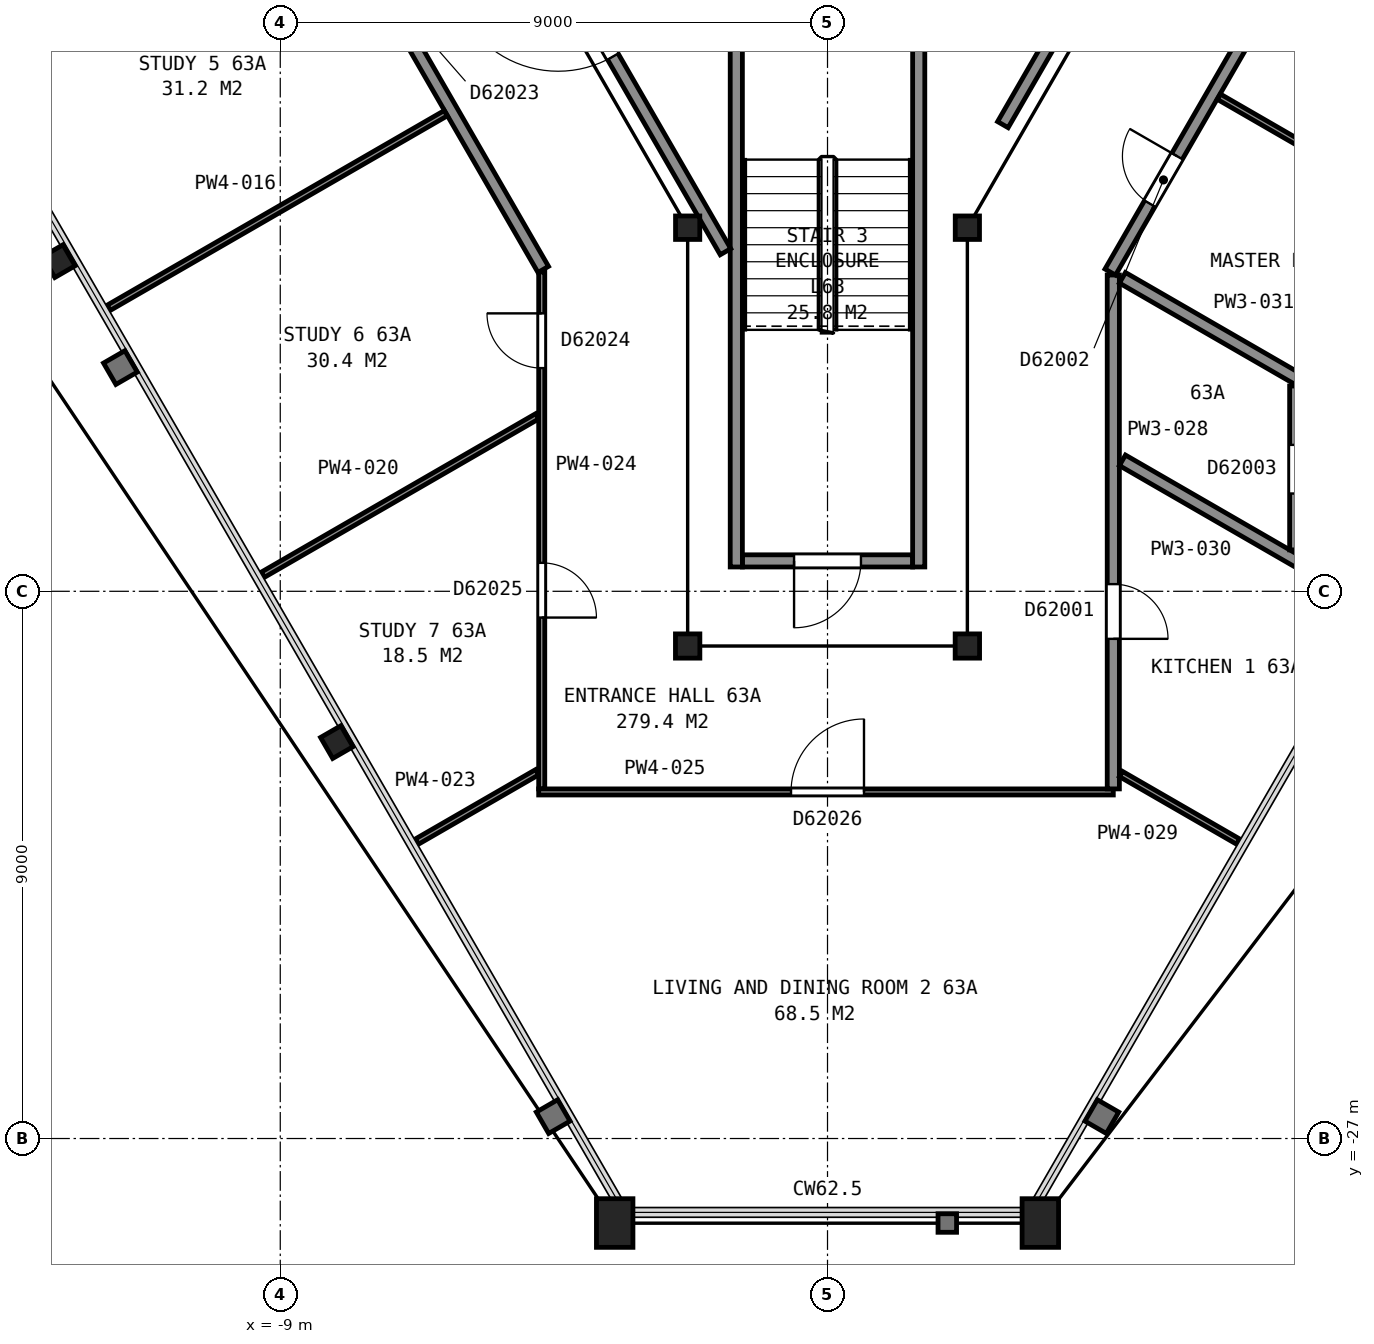
"""IFC4 building model, lengths in metres.
Left out: names, types, materials, properties, quantities, classifications, styles, units other than length and angle.
Written with IfcOpenShell. Run it as: python <this file> out.ifc"""

import sys

from ifc_helpers import new_model, si_unit, direction, frame, frame_2d, origin, origin_2d, place, context, subcontext, project, spatial, rectangle, hollow_rectangle, i_section, extrude, element, fill, save


model = new_model("IFC4")
c1 = context("Model", 3, precision=1e-05, world=origin(), true_north=direction((0.0, 1.0)))
c2 = subcontext(c1, "Body", "Model", "MODEL_VIEW")
j1 = project(units=[si_unit("LENGTHUNIT", "METRE"), si_unit("PLANEANGLEUNIT", "RADIAN")], contexts=[c1])
p1 = place(None, origin())
s1 = spatial("IfcSite", under=j1, at=p1, CompositionType="ELEMENT")
p2 = place(p1, origin())
s2 = spatial("IfcBuilding", under=s1, at=p2, CompositionType="ELEMENT")
p3 = place(p2, frame((0.0, 0.0, 250.8)))
s3 = spatial("IfcBuildingStorey", under=s2, at=p3, CompositionType="ELEMENT", Elevation=250.8)
for number, where, z_axis, x_axis in (
    (1, (-12.64, -12.57, 0.0), (0.0, 0.0, 1.0), (-0.5, 0.866, 0.0)),
    (2, (-8.07, -20.48, 0.0), (0.0, 0.0, 1.0), (-0.5, 0.866, 0.0)),
):
    element("IfcColumn", number, at=place(p3, frame(where, z_axis=z_axis, x_axis=x_axis)), inside=s3, PredefinedType="COLUMN", context=c2, shape_type="SweptSolid", body=[
        extrude(i_section(OverallWidth=0.399, OverallDepth=0.386, WebThickness=0.021, FlangeThickness=0.033, FilletRadius=0.015, at=origin_2d()), origin(), (0.0, 0.0, 1.0), 3.7),
    ])
for number, where, z_axis, x_axis in (
    (3, (-3.5, -28.39, 0.0), (0.0, 0.0, 1.0), (-1.0, 0.0, 0.0)),
    (4, (3.5, -28.39, 0.0), (0.0, 0.0, 1.0), (-1.0, 0.0, 0.0)),
):
    element("IfcColumn", number, at=place(p3, frame(where, z_axis=z_axis, x_axis=x_axis)), inside=s3, PredefinedType="COLUMN", context=c2, shape_type="SweptSolid", body=[
        extrude(hollow_rectangle(XDim=0.6, YDim=0.8, WallThickness=0.05, at=origin_2d()), origin(), (0.0, 0.0, 1.0), 3.7),
    ])
p4 = place(p3, frame((-2.3, -12.02, 0.0), z_axis=(0.0, 0.0, 1.0), x_axis=(1.0, 0.0, 0.0)))
e5 = element("IfcColumn", 5, at=p4, inside=s3, PredefinedType="COLUMN", context=c2, shape_type="SweptSolid", body=[
    extrude(i_section(OverallWidth=0.399, OverallDepth=0.386, WebThickness=0.021, FlangeThickness=0.033, FilletRadius=0.015, at=origin_2d()), origin(), (0.0, 0.0, 1.0), 3.7),
])
for number, where, z_axis, x_axis in (
    (6, (-2.3, -18.9, 0.0), (0.0, 0.0, 1.0), (-1.0, 0.0, 0.0)),
    (7, (2.3, -18.9, 0.0), (0.0, 0.0, 1.0), (-1.0, 0.0, 0.0)),
):
    element("IfcColumn", number, at=place(p3, frame(where, z_axis=z_axis, x_axis=x_axis)), inside=s3, PredefinedType="COLUMN", context=c2, shape_type="SweptSolid", body=[
        extrude(i_section(OverallWidth=0.401, OverallDepth=0.399, WebThickness=0.025, FlangeThickness=0.04, FilletRadius=0.015, at=origin_2d()), origin(), (0.0, 0.0, 1.0), 3.7),
    ])
p5 = place(p3, frame((2.3, -12.02, 0.0), z_axis=(0.0, 0.0, 1.0), x_axis=(1.0, 0.0, 0.0)))
e8 = element("IfcColumn", 8, at=p5, inside=s3, PredefinedType="COLUMN", context=c2, shape_type="SweptSolid", body=[
    extrude(i_section(OverallWidth=0.399, OverallDepth=0.386, WebThickness=0.021, FlangeThickness=0.033, FilletRadius=0.015, at=origin_2d()), origin(), (0.0, 0.0, 1.0), 3.7),
])
p6 = place(p3, frame((-1.4, -17.5, 0.0), z_axis=(0.0, 0.0, 1.0), x_axis=(1.0, 0.0, 0.0)))
e9 = element("IfcWall", 9, at=p6, inside=s3, PredefinedType="PARTITIONING", context=c2, shape_type="SweptSolid", body=[
    extrude(rectangle(XDim=2.8, YDim=0.2, at=frame_2d((1.4, 0.0))), origin(), (0.0, 0.0, 1.0), 3.45),
])
p7 = place(p6, frame((0.85, 0.0, 0.0)))
e10 = element("IfcOpeningElement", 10, at=p7, cuts=e9, PredefinedType="OPENING", context=c2, shape_type="SweptSolid", body=[
    extrude(rectangle(XDim=1.1, YDim=2.1, at=frame_2d((0.55, 1.05))), frame((0.0, 0.11, 0.0), z_axis=(0.0, -1.0, 0.0), x_axis=(1.0, 0.0, 0.0)), (0.0, 0.0, 1.0), 0.22),
])
for number, where, z_axis, x_axis in (
    (11, (1.5, -8.0, 0.0), (0.0, 0.0, 1.0), (0.0, -1.0, 0.0)),
    (12, (-1.5, -8.0, 0.0), (0.0, 0.0, 1.0), (0.0, -1.0, 0.0)),
):
    element("IfcWall", number, at=place(p3, frame(where, z_axis=z_axis, x_axis=x_axis)), inside=s3, PredefinedType="PARTITIONING", context=c2, shape_type="SweptSolid", body=[
        extrude(rectangle(XDim=9.6, YDim=0.2, at=frame_2d((4.8, 0.0))), origin(), (0.0, 0.0, 1.0), 3.45),
    ])
p8 = place(p3, frame((-4.655, -7.257, 0.0), z_axis=(0.0, 0.0, 1.0), x_axis=(0.499966124405, -0.866044960985, 0.0)))
e13 = element("IfcWall", 13, at=p8, inside=s3, PredefinedType="PARTITIONING", context=c2, shape_type="SweptSolid", body=[
    extrude(rectangle(XDim=5.956, YDim=0.2, at=frame_2d((2.978, 0.0))), origin(), (0.0, 0.0, 1.0), 3.45),
])
p9 = place(p8, frame((0.45, 0.0, 0.0)))
e14 = element("IfcOpeningElement", 14, at=p9, cuts=e13, PredefinedType="OPENING", context=c2, shape_type="SweptSolid", body=[
    extrude(rectangle(XDim=1.8, YDim=2.1, at=frame_2d((0.9, 1.05))), frame((0.0, 0.11, 0.0), z_axis=(0.0, -1.0, 0.0), x_axis=(1.0, 0.0, 0.0)), (0.0, 0.0, 1.0), 0.22),
])
p10 = place(p3, frame((2.884, -10.325, 0.0), z_axis=(0.0, 0.0, 1.0), x_axis=(0.500094932804, 0.865970587366, 0.0)))
e15 = element("IfcWall", 15, at=p10, inside=s3, PredefinedType="PARTITIONING", context=c2, shape_type="SweptSolid", body=[
    extrude(rectangle(XDim=3.763, YDim=0.2, at=frame_2d((1.882, 0.0))), origin(), (0.0, 0.0, 1.0), 3.45),
])
p11 = place(p3, frame((-4.675, -12.706, 0.0), z_axis=(0.0, 0.0, 1.0), x_axis=(-0.499972470324, 0.866041297467, 0.0)))
e16 = element("IfcWall", 16, at=p11, inside=s3, PredefinedType="PARTITIONING", context=c2, shape_type="SweptSolid", body=[
    extrude(rectangle(XDim=17.385, YDim=0.2, at=frame_2d((8.692, 0.0))), origin(), (0.0, 0.0, 1.0), 2.713),
])
p12 = place(p11, frame((14.57, 0.0, 0.0)))
e17 = element("IfcOpeningElement", 17, at=p12, cuts=e16, PredefinedType="OPENING", context=c2, shape_type="SweptSolid", body=[
    extrude(rectangle(XDim=0.9, YDim=2.1, at=frame_2d((0.45, 1.05))), frame((0.0, 0.11, 0.0), z_axis=(0.0, -1.0, 0.0), x_axis=(1.0, 0.0, 0.0)), (0.0, 0.0, 1.0), 0.22),
])
p13 = place(p11, frame((11.777, 0.0, 0.0)))
e18 = element("IfcOpeningElement", 18, at=p13, cuts=e16, PredefinedType="OPENING", context=c2, shape_type="SweptSolid", body=[
    extrude(rectangle(XDim=0.9, YDim=2.1, at=frame_2d((0.45, 1.05))), frame((0.0, 0.11, 0.0), z_axis=(0.0, -1.0, 0.0), x_axis=(1.0, 0.0, 0.0)), (0.0, 0.0, 1.0), 0.22),
])
p14 = place(p11, frame((5.095, 0.0, 0.0)))
e19 = element("IfcOpeningElement", 19, at=p14, cuts=e16, PredefinedType="OPENING", context=c2, shape_type="SweptSolid", body=[
    extrude(rectangle(XDim=0.9, YDim=2.1, at=frame_2d((0.45, 1.05))), frame((0.0, 0.11, 0.0), z_axis=(0.0, -1.0, 0.0), x_axis=(1.0, 0.0, 0.0)), (0.0, 0.0, 1.0), 0.22),
])
p15 = place(p3, frame((-11.821, -13.337, 0.0), z_axis=(0.0, 0.0, 1.0), x_axis=(0.866013405822, 0.500020780506, 0.0)))
e20 = element("IfcWall", 20, at=p15, inside=s3, PredefinedType="PARTITIONING", context=c2, shape_type="SweptSolid", body=[
    extrude(rectangle(XDim=6.399, YDim=0.1, at=frame_2d((3.2, 0.0))), origin(), (0.0, 0.0, 1.0), 2.713),
])
p16 = place(p3, frame((-9.286, -17.727, 0.0), z_axis=(0.0, 0.0, 1.0), x_axis=(0.865990461678, 0.50006051662, 0.0)))
e21 = element("IfcWall", 21, at=p16, inside=s3, PredefinedType="PARTITIONING", context=c2, shape_type="SweptSolid", body=[
    extrude(rectangle(XDim=5.209, YDim=0.1, at=frame_2d((2.604, 0.0))), origin(), (0.0, 0.0, 1.0), 2.713),
])
p17 = place(p3, frame((-6.752, -22.116, 0.0), z_axis=(0.0, 0.0, 1.0), x_axis=(0.866135723987, 0.499808871103, 0.0)))
e22 = element("IfcWall", 22, at=p17, inside=s3, PredefinedType="PARTITIONING", context=c2, shape_type="SweptSolid", body=[
    extrude(rectangle(XDim=2.283, YDim=0.1, at=frame_2d((1.141, 0.0))), origin(), (0.0, 0.0, 1.0), 2.713),
])
p18 = place(p3, frame((-4.7, -21.25, 0.0), z_axis=(0.0, 0.0, 1.0), x_axis=(0.0, 1.0, 0.0)))
e23 = element("IfcWall", 23, at=p18, inside=s3, PredefinedType="PARTITIONING", context=c2, shape_type="SweptSolid", body=[
    extrude(rectangle(XDim=8.502, YDim=0.1, at=frame_2d((4.251, 0.0))), origin(), (0.0, 0.0, 1.0), 2.713),
])
p19 = place(p18, frame((6.921, 0.0, 0.0)))
e24 = element("IfcOpeningElement", 24, at=p19, cuts=e23, PredefinedType="OPENING", context=c2, shape_type="SweptSolid", body=[
    extrude(rectangle(XDim=0.9, YDim=2.1, at=frame_2d((0.45, 1.05))), frame((0.0, 0.06, 0.0), z_axis=(0.0, -1.0, 0.0), x_axis=(1.0, 0.0, 0.0)), (0.0, 0.0, 1.0), 0.12),
])
p20 = place(p18, frame((2.818, 0.0, 0.0)))
e25 = element("IfcOpeningElement", 25, at=p20, cuts=e23, PredefinedType="OPENING", context=c2, shape_type="SweptSolid", body=[
    extrude(rectangle(XDim=0.9, YDim=2.1, at=frame_2d((0.45, 1.05))), frame((0.0, 0.06, 0.0), z_axis=(0.0, -1.0, 0.0), x_axis=(1.0, 0.0, 0.0)), (0.0, 0.0, 1.0), 0.12),
])
p21 = place(p3, frame((4.7, -21.3, 0.0), z_axis=(0.0, 0.0, 1.0), x_axis=(-1.0, 0.0, 0.0)))
e26 = element("IfcWall", 26, at=p21, inside=s3, PredefinedType="PARTITIONING", context=c2, shape_type="SweptSolid", body=[
    extrude(rectangle(XDim=9.45, YDim=0.1, at=frame_2d((4.725, 0.0))), origin(), (0.0, 0.0, 1.0), 2.713),
])
p22 = place(p21, frame((4.1, 0.0, 0.0)))
e27 = element("IfcOpeningElement", 27, at=p22, cuts=e26, PredefinedType="OPENING", context=c2, shape_type="SweptSolid", body=[
    extrude(rectangle(XDim=1.2, YDim=2.1, at=frame_2d((0.6, 1.05))), frame((0.0, 0.06, 0.0), z_axis=(0.0, -1.0, 0.0), x_axis=(1.0, 0.0, 0.0)), (0.0, 0.0, 1.0), 0.12),
])
p23 = place(p3, frame((4.7, -12.798, 0.0), z_axis=(0.0, 0.0, 1.0), x_axis=(0.0, -1.0, 0.0)))
e28 = element("IfcWall", 28, at=p23, inside=s3, PredefinedType="PARTITIONING", context=c2, shape_type="SweptSolid", body=[
    extrude(rectangle(XDim=8.452, YDim=0.2, at=frame_2d((4.226, 0.0))), origin(), (0.0, 0.0, 1.0), 2.713),
])
p24 = place(p23, frame((5.084, 0.0, 0.0)))
e29 = element("IfcOpeningElement", 29, at=p24, cuts=e28, PredefinedType="OPENING", context=c2, shape_type="SweptSolid", body=[
    extrude(rectangle(XDim=0.9, YDim=2.1, at=frame_2d((0.45, 1.05))), frame((0.0, 0.11, 0.0), z_axis=(0.0, -1.0, 0.0), x_axis=(1.0, 0.0, 0.0)), (0.0, 0.0, 1.0), 0.22),
])
p25 = place(p3, frame((4.825, -21.004, 0.0), z_axis=(0.0, 0.0, 1.0), x_axis=(0.866121639155, -0.499833278392, 0.0)))
e30 = element("IfcWall", 30, at=p25, inside=s3, PredefinedType="PARTITIONING", context=c2, shape_type="SweptSolid", body=[
    extrude(rectangle(XDim=2.225, YDim=0.1, at=frame_2d((1.112, 0.0))), origin(), (0.0, 0.0, 1.0), 2.713),
])
p26 = place(p3, frame((4.85, -15.846, 0.0), z_axis=(0.0, 0.0, 1.0), x_axis=(0.866007055173, -0.500031779381, 0.0)))
e31 = element("IfcWall", 31, at=p26, inside=s3, PredefinedType="PARTITIONING", context=c2, shape_type="SweptSolid", body=[
    extrude(rectangle(XDim=4.782, YDim=0.2, at=frame_2d((2.391, 0.0))), origin(), (0.0, 0.0, 1.0), 2.713),
])
p27 = place(p3, frame((4.85, -12.844, 0.0), z_axis=(0.0, 0.0, 1.0), x_axis=(0.866005731893, -0.500034071167, 0.0)))
e32 = element("IfcWall", 32, at=p27, inside=s3, PredefinedType="PARTITIONING", context=c2, shape_type="SweptSolid", body=[
    extrude(rectangle(XDim=3.391, YDim=0.2, at=frame_2d((1.695, 0.0))), origin(), (0.0, 0.0, 1.0), 2.713),
])
p28 = place(p3, frame((13.342, 2.306, 0.0), z_axis=(0.0, 0.0, 1.0), x_axis=(-0.499983003136, -0.866035216706, 0.0)))
e33 = element("IfcWall", 33, at=p28, inside=s3, PredefinedType="PARTITIONING", context=c2, shape_type="SweptSolid", body=[
    extrude(rectangle(XDim=17.385, YDim=0.2, at=frame_2d((8.692, 0.0))), origin(), (0.0, 0.0, 1.0), 2.713),
])
p29 = place(p28, frame((15.185, 0.0, 0.0)))
e34 = element("IfcOpeningElement", 34, at=p29, cuts=e33, PredefinedType="OPENING", context=c2, shape_type="SweptSolid", body=[
    extrude(rectangle(XDim=0.9, YDim=2.1, at=frame_2d((0.45, 1.05))), frame((0.0, 0.11, 0.0), z_axis=(0.0, -1.0, 0.0), x_axis=(1.0, 0.0, 0.0)), (0.0, 0.0, 1.0), 0.22),
])
p30 = place(p28, frame((12.094, 0.0, 0.0)))
e35 = element("IfcOpeningElement", 35, at=p30, cuts=e33, PredefinedType="OPENING", context=c2, shape_type="SweptSolid", body=[
    extrude(rectangle(XDim=0.9, YDim=2.1, at=frame_2d((0.45, 1.05))), frame((0.0, 0.11, 0.0), z_axis=(0.0, -1.0, 0.0), x_axis=(1.0, 0.0, 0.0)), (0.0, 0.0, 1.0), 0.22),
])
p31 = place(p28, frame((5.867, 0.0, 0.0)))
e36 = element("IfcOpeningElement", 36, at=p31, cuts=e33, PredefinedType="OPENING", context=c2, shape_type="SweptSolid", body=[
    extrude(rectangle(XDim=0.9, YDim=2.1, at=frame_2d((0.45, 1.05))), frame((0.0, 0.11, 0.0), z_axis=(0.0, -1.0, 0.0), x_axis=(1.0, 0.0, 0.0)), (0.0, 0.0, 1.0), 0.22),
])
p32 = place(p28, frame((1.392, 0.0, 0.0)))
e37 = element("IfcOpeningElement", 37, at=p32, cuts=e33, PredefinedType="OPENING", context=c2, shape_type="SweptSolid", body=[
    extrude(rectangle(XDim=0.9, YDim=2.1, at=frame_2d((0.45, 1.05))), frame((0.0, 0.11, 0.0), z_axis=(0.0, -1.0, 0.0), x_axis=(1.0, 0.0, 0.0)), (0.0, 0.0, 1.0), 0.22),
])
p33 = place(p3, frame((6.436, -9.865, 0.0), z_axis=(0.0, 0.0, 1.0), x_axis=(0.866013405822, -0.500020780506, 0.0)))
e38 = element("IfcWall", 38, at=p33, inside=s3, PredefinedType="PARTITIONING", context=c2, shape_type="SweptSolid", body=[
    extrude(rectangle(XDim=6.399, YDim=0.1, at=frame_2d((3.2, 0.0))), origin(), (0.0, 0.0, 1.0), 2.713),
])
p34 = place(p3, frame((7.7, -17.319, 0.0), z_axis=(0.0, 0.0, 1.0), x_axis=(0.0, 1.0, 0.0)))
e39 = element("IfcWall", 39, at=p34, inside=s3, PredefinedType="PARTITIONING", context=c2, shape_type="SweptSolid", body=[
    extrude(rectangle(XDim=2.695, YDim=0.2, at=frame_2d((1.347, 0.0))), origin(), (0.0, 0.0, 1.0), 2.713),
])
p35 = place(p34, frame((0.927, 0.0, 0.0)))
e40 = element("IfcOpeningElement", 40, at=p35, cuts=e39, PredefinedType="OPENING", context=c2, shape_type="SweptSolid", body=[
    extrude(rectangle(XDim=0.8, YDim=2.1, at=frame_2d((0.4, 1.05))), frame((0.0, 0.11, 0.0), z_axis=(0.0, -1.0, 0.0), x_axis=(1.0, 0.0, 0.0)), (0.0, 0.0, 1.0), 0.22),
])
p36 = place(p7, origin())
e41 = element("IfcDoor", 41, at=p36, inside=s3, OperationType="SINGLE_SWING_LEFT", PredefinedType="DOOR", context=c2, shape_type="SweptSolid", body=[
    extrude(rectangle(XDim=1.1, YDim=2.1, at=frame_2d((0.55, 1.05))), frame((0.0, 0.025, 0.0), z_axis=(0.0, -1.0, 0.0), x_axis=(1.0, 0.0, 0.0)), (0.0, 0.0, 1.0), 0.05),
])
fill(e10, e41)
p37 = place(p9, origin())
e42 = element("IfcDoor", 42, at=p37, inside=s3, OperationType="DOUBLE_DOOR_SINGLE_SWING", PredefinedType="DOOR", context=c2, shape_type="SweptSolid", body=[
    extrude(rectangle(XDim=1.8, YDim=2.1, at=frame_2d((0.9, 1.05))), frame((0.0, 0.025, 0.0), z_axis=(0.0, -1.0, 0.0), x_axis=(1.0, 0.0, 0.0)), (0.0, 0.0, 1.0), 0.05),
])
fill(e14, e42)
p38 = place(p19, origin())
e43 = element("IfcDoor", 43, at=p38, inside=s3, OperationType="SINGLE_SWING_RIGHT", PredefinedType="DOOR", context=c2, shape_type="SweptSolid", body=[
    extrude(rectangle(XDim=0.9, YDim=2.1, at=frame_2d((0.45, 1.05))), frame((0.0, 0.025, 0.0), z_axis=(0.0, -1.0, 0.0), x_axis=(1.0, 0.0, 0.0)), (0.0, 0.0, 1.0), 0.05),
])
fill(e24, e43)
p39 = place(p20, origin())
e44 = element("IfcDoor", 44, at=p39, inside=s3, OperationType="SINGLE_SWING_LEFT", PredefinedType="DOOR", context=c2, shape_type="SweptSolid", body=[
    extrude(rectangle(XDim=0.9, YDim=2.1, at=frame_2d((0.45, 1.05))), frame((0.0, 0.025, 0.0), z_axis=(0.0, -1.0, 0.0), x_axis=(1.0, 0.0, 0.0)), (0.0, 0.0, 1.0), 0.05),
])
fill(e25, e44)
p40 = place(p22, origin())
e45 = element("IfcDoor", 45, at=p40, inside=s3, OperationType="SINGLE_SWING_LEFT", PredefinedType="DOOR", context=c2, shape_type="SweptSolid", body=[
    extrude(rectangle(XDim=1.2, YDim=2.1, at=frame_2d((0.6, 1.05))), frame((0.0, 0.025, 0.0), z_axis=(0.0, -1.0, 0.0), x_axis=(1.0, 0.0, 0.0)), (0.0, 0.0, 1.0), 0.05),
])
fill(e27, e45)
p41 = place(p24, origin())
e46 = element("IfcDoor", 46, at=p41, inside=s3, OperationType="SINGLE_SWING_RIGHT", PredefinedType="DOOR", context=c2, shape_type="SweptSolid", body=[
    extrude(rectangle(XDim=0.9, YDim=2.1, at=frame_2d((0.45, 1.05))), frame((0.0, 0.025, 0.0), z_axis=(0.0, -1.0, 0.0), x_axis=(1.0, 0.0, 0.0)), (0.0, 0.0, 1.0), 0.05),
])
fill(e29, e46)
p42 = place(p29, origin())
e47 = element("IfcDoor", 47, at=p42, inside=s3, OperationType="SINGLE_SWING_LEFT", PredefinedType="DOOR", context=c2, shape_type="SweptSolid", body=[
    extrude(rectangle(XDim=0.9, YDim=2.1, at=frame_2d((0.45, 1.05))), frame((0.0, 0.025, 0.0), z_axis=(0.0, -1.0, 0.0), x_axis=(1.0, 0.0, 0.0)), (0.0, 0.0, 1.0), 0.05),
])
fill(e34, e47)
p43 = place(p35, origin())
e48 = element("IfcDoor", 48, at=p43, inside=s3, OperationType="SINGLE_SWING_LEFT", PredefinedType="DOOR", context=c2, shape_type="SweptSolid", body=[
    extrude(rectangle(XDim=0.8, YDim=2.1, at=frame_2d((0.4, 1.05))), frame((0.0, 0.025, 0.0), z_axis=(0.0, -1.0, 0.0), x_axis=(1.0, 0.0, 0.0)), (0.0, 0.0, 1.0), 0.05),
])
fill(e40, e48)
save(model, sys.argv[1])
